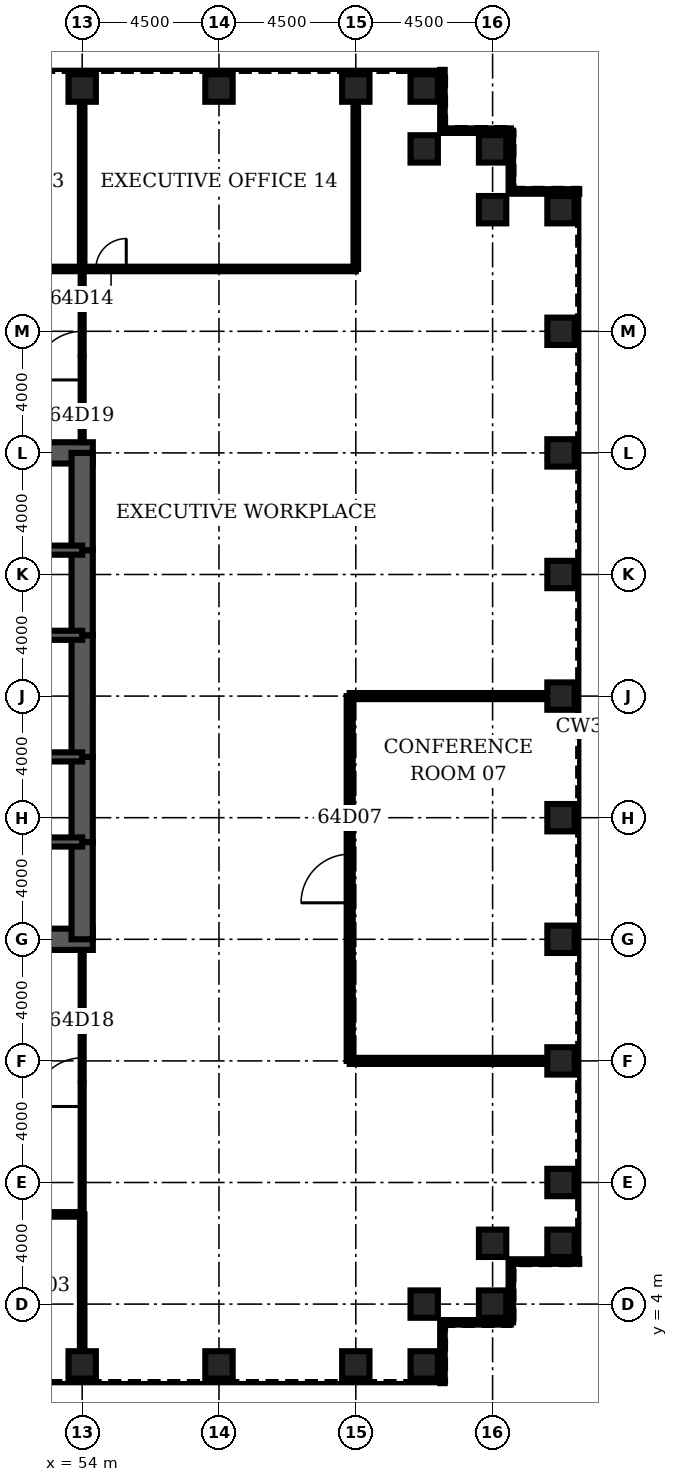
"""IFC4 building model, lengths in metres.
Left out: names, types, materials, properties, quantities, classifications, styles, units other than length and angle.
Written with IfcOpenShell. Run it as: python <this file> out.ifc"""

import sys

from ifc_helpers import new_model, si_unit, direction, frame, frame_2d, origin, origin_2d, place, context, subcontext, project, spatial, rectangle, hollow_rectangle, extrude, element, fill, save


model = new_model("IFC4")
c1 = context("Model", 3, precision=1e-05, world=origin(), true_north=direction((0.0, 1.0)))
c2 = subcontext(c1, "Body", "Model", "MODEL_VIEW")
j1 = project(units=[si_unit("LENGTHUNIT", "METRE"), si_unit("PLANEANGLEUNIT", "RADIAN")], contexts=[c1])
p1 = place(None, origin())
s1 = spatial("IfcSite", under=j1, at=p1, CompositionType="ELEMENT")
p2 = place(p1, origin())
s2 = spatial("IfcBuilding", under=s1, at=p2, CompositionType="ELEMENT")
p3 = place(p2, frame((0.0, 0.0, 283.7)))
s3 = spatial("IfcBuildingStorey", under=s2, at=p3, CompositionType="ELEMENT", Elevation=283.7)
for number, where, z_axis, x_axis in (
    (1, (54.0, 2.0, 0.0), (0.0, 0.0, 1.0), (0.0, 1.0, 0.0)),
    (2, (58.5, 2.0, 0.0), (0.0, 0.0, 1.0), (0.0, 1.0, 0.0)),
    (3, (63.0, 2.0, 0.0), (0.0, 0.0, 1.0), (0.0, 1.0, 0.0)),
    (4, (65.25, 2.0, 0.0), (0.0, 0.0, 1.0), (0.0, 1.0, 0.0)),
    (5, (65.25, 4.0, 0.0), (0.0, 0.0, 1.0), (0.0, 1.0, 0.0)),
    (6, (67.5, 4.0, 0.0), (0.0, 0.0, 1.0), (1.0, 0.0, 0.0)),
    (7, (67.5, 6.0, 0.0), (0.0, 0.0, 1.0), (1.0, 0.0, 0.0)),
    (8, (69.75, 6.0, 0.0), (0.0, 0.0, 1.0), (1.0, 0.0, 0.0)),
    (9, (69.75, 8.0, 0.0), (0.0, 0.0, 1.0), (1.0, 0.0, 0.0)),
    (10, (69.75, 12.0, 0.0), (0.0, 0.0, 1.0), (1.0, 0.0, 0.0)),
    (11, (69.75, 16.0, 0.0), (0.0, 0.0, 1.0), (1.0, 0.0, 0.0)),
    (12, (69.75, 20.0, 0.0), (0.0, 0.0, 1.0), (1.0, 0.0, 0.0)),
    (13, (69.75, 24.0, 0.0), (0.0, 0.0, 1.0), (1.0, 0.0, 0.0)),
    (14, (69.75, 28.0, 0.0), (0.0, 0.0, 1.0), (1.0, 0.0, 0.0)),
    (15, (69.75, 32.0, 0.0), (0.0, 0.0, 1.0), (1.0, 0.0, 0.0)),
    (16, (69.75, 36.0, 0.0), (0.0, 0.0, 1.0), (1.0, 0.0, 0.0)),
    (17, (69.75, 40.0, 0.0), (0.0, 0.0, 1.0), (1.0, 0.0, 0.0)),
    (18, (67.5, 40.0, 0.0), (0.0, 0.0, 1.0), (1.0, 0.0, 0.0)),
    (19, (67.5, 42.0, 0.0), (0.0, 0.0, 1.0), (1.0, 0.0, 0.0)),
    (20, (65.25, 42.0, 0.0), (0.0, 0.0, 1.0), (0.0, 1.0, 0.0)),
    (21, (65.25, 44.0, 0.0), (0.0, 0.0, 1.0), (0.0, 1.0, 0.0)),
    (22, (63.0, 44.0, 0.0), (0.0, 0.0, 1.0), (0.0, 1.0, 0.0)),
    (23, (58.5, 44.0, 0.0), (0.0, 0.0, 1.0), (0.0, 1.0, 0.0)),
    (24, (54.0, 44.0, 0.0), (0.0, 0.0, 1.0), (0.0, 1.0, 0.0)),
):
    element("IfcColumn", number, at=place(p3, frame(where, z_axis=z_axis, x_axis=x_axis)), inside=s3, PredefinedType="COLUMN", context=c2, shape_type="SweptSolid", body=[
        extrude(hollow_rectangle(XDim=0.9, YDim=0.9, WallThickness=0.07, at=origin_2d()), origin(), (0.0, 0.0, 1.0), 4.2),
    ])
for number, where, z_axis, x_axis in (
    (25, (45.0, 16.0, 0.0), (0.0, 0.0, 1.0), (1.0, 0.0, 0.0)),
    (26, (54.35, 32.0, 0.0), (0.0, 0.0, 1.0), (-1.0, 0.0, 0.0)),
):
    element("IfcWall", number, at=place(p3, frame(where, z_axis=z_axis, x_axis=x_axis)), inside=s3, PredefinedType="SHEAR", context=c2, shape_type="SweptSolid", body=[
        extrude(rectangle(XDim=9.35, YDim=0.7, at=frame_2d((4.675, 0.0))), origin(), (0.0, 0.0, 1.0), 4.2),
    ])
p4 = place(p3, frame((54.0, 16.0, 0.0), z_axis=(0.0, 0.0, 1.0), x_axis=(0.0, 1.0, 0.0)))
e27 = element("IfcWall", 27, at=p4, inside=s3, PredefinedType="SHEAR", context=c2, shape_type="SweptSolid", body=[
    extrude(rectangle(XDim=3.2, YDim=0.7, at=frame_2d((1.6, 0.0))), origin(), (0.0, 0.0, 1.0), 4.2),
])
p5 = place(p3, frame((54.0, 19.2, 0.0), z_axis=(0.0, 0.0, 1.0), x_axis=(0.0, 1.0, 0.0)))
e28 = element("IfcWall", 28, at=p5, inside=s3, PredefinedType="SHEAR", context=c2, shape_type="SweptSolid", body=[
    extrude(rectangle(XDim=2.8, YDim=0.7, at=frame_2d((1.4, 0.0))), origin(), (0.0, 0.0, 1.0), 4.2),
])
p6 = place(p5, frame((0.4, 0.0, 0.0)))
e29 = element("IfcOpeningElement", 29, at=p6, cuts=e28, PredefinedType="OPENING", context=c2, shape_type="SweptSolid", body=[
    extrude(rectangle(XDim=1.8, YDim=2.1, at=frame_2d((0.9, 1.05))), frame((0.0, 0.36, 0.0), z_axis=(0.0, -1.0, 0.0), x_axis=(1.0, 0.0, 0.0)), (0.0, 0.0, 1.0), 0.72),
])
p7 = place(p3, frame((54.0, 22.0, 0.0), z_axis=(0.0, 0.0, 1.0), x_axis=(0.0, 1.0, 0.0)))
e30 = element("IfcWall", 30, at=p7, inside=s3, PredefinedType="SHEAR", context=c2, shape_type="SweptSolid", body=[
    extrude(rectangle(XDim=4.0, YDim=0.7, at=frame_2d((2.0, 0.0))), origin(), (0.0, 0.0, 1.0), 4.2),
])
p8 = place(p3, frame((54.0, 26.0, 0.0), z_axis=(0.0, 0.0, 1.0), x_axis=(0.0, 1.0, 0.0)))
e31 = element("IfcWall", 31, at=p8, inside=s3, PredefinedType="SHEAR", context=c2, shape_type="SweptSolid", body=[
    extrude(rectangle(XDim=2.8, YDim=0.7, at=frame_2d((1.4, 0.0))), origin(), (0.0, 0.0, 1.0), 4.2),
])
p9 = place(p8, frame((0.6, 0.0, 0.0)))
e32 = element("IfcOpeningElement", 32, at=p9, cuts=e31, PredefinedType="OPENING", context=c2, shape_type="SweptSolid", body=[
    extrude(rectangle(XDim=1.8, YDim=2.1, at=frame_2d((0.9, 1.05))), frame((0.0, 0.36, 0.0), z_axis=(0.0, -1.0, 0.0), x_axis=(1.0, 0.0, 0.0)), (0.0, 0.0, 1.0), 0.72),
])
p10 = place(p3, frame((54.0, 28.8, 0.0), z_axis=(0.0, 0.0, 1.0), x_axis=(0.0, 1.0, 0.0)))
e33 = element("IfcWall", 33, at=p10, inside=s3, PredefinedType="SHEAR", context=c2, shape_type="SweptSolid", body=[
    extrude(rectangle(XDim=3.2, YDim=0.7, at=frame_2d((1.6, 0.0))), origin(), (0.0, 0.0, 1.0), 4.2),
])
p11 = place(p3, frame((45.0, 19.2, 0.0), z_axis=(0.0, 0.0, 1.0), x_axis=(1.0, 0.0, 0.0)))
e34 = element("IfcWall", 34, at=p11, inside=s3, PredefinedType="SOLIDWALL", context=c2, shape_type="SweptSolid", body=[
    extrude(rectangle(XDim=9.0, YDim=0.3, at=frame_2d((4.5, 0.0))), origin(), (0.0, 0.0, 1.0), 4.2),
])
p12 = place(p11, frame((7.35, 0.0, 0.0)))
e35 = element("IfcOpeningElement", 35, at=p12, cuts=e34, PredefinedType="OPENING", context=c2, shape_type="SweptSolid", body=[
    extrude(rectangle(XDim=1.0, YDim=2.1, at=frame_2d((0.5, 1.05))), frame((0.0, 0.16, 0.0), z_axis=(0.0, -1.0, 0.0), x_axis=(1.0, 0.0, 0.0)), (0.0, 0.0, 1.0), 0.32),
])
p13 = place(p3, frame((45.0, 28.8, 0.0), z_axis=(0.0, 0.0, 1.0), x_axis=(1.0, 0.0, 0.0)))
e36 = element("IfcWall", 36, at=p13, inside=s3, PredefinedType="SOLIDWALL", context=c2, shape_type="SweptSolid", body=[
    extrude(rectangle(XDim=9.0, YDim=0.3, at=frame_2d((4.5, 0.0))), origin(), (0.0, 0.0, 1.0), 4.2),
])
p14 = place(p13, frame((7.35, 0.0, 0.0)))
e37 = element("IfcOpeningElement", 37, at=p14, cuts=e36, PredefinedType="OPENING", context=c2, shape_type="SweptSolid", body=[
    extrude(rectangle(XDim=1.0, YDim=2.1, at=frame_2d((0.5, 1.05))), frame((0.0, 0.16, 0.0), z_axis=(0.0, -1.0, 0.0), x_axis=(1.0, 0.0, 0.0)), (0.0, 0.0, 1.0), 0.32),
])
p15 = place(p3, frame((48.0, 22.0, 0.0), z_axis=(0.0, 0.0, 1.0), x_axis=(1.0, 0.0, 0.0)))
e38 = element("IfcWall", 38, at=p15, inside=s3, PredefinedType="SOLIDWALL", context=c2, shape_type="SweptSolid", body=[
    extrude(rectangle(XDim=6.0, YDim=0.3, at=frame_2d((3.0, 0.0))), origin(), (0.0, 0.0, 1.0), 4.2),
])
p16 = place(p15, frame((2.0, 0.0, 0.0)))
e39 = element("IfcOpeningElement", 39, at=p16, cuts=e38, PredefinedType="OPENING", context=c2, shape_type="SweptSolid", body=[
    extrude(rectangle(XDim=1.0, YDim=2.1, at=frame_2d((0.5, 1.05))), frame((0.0, 0.16, 0.0), z_axis=(0.0, -1.0, 0.0), x_axis=(1.0, 0.0, 0.0)), (0.0, 0.0, 1.0), 0.32),
])
p17 = place(p15, frame((4.4, 0.0, 0.0)))
e40 = element("IfcOpeningElement", 40, at=p17, cuts=e38, PredefinedType="OPENING", context=c2, shape_type="SweptSolid", body=[
    extrude(rectangle(XDim=1.0, YDim=2.1, at=frame_2d((0.5, 1.05))), frame((0.0, 0.16, 0.0), z_axis=(0.0, -1.0, 0.0), x_axis=(1.0, 0.0, 0.0)), (0.0, 0.0, 1.0), 0.32),
])
p18 = place(p3, frame((48.0, 26.0, 0.0), z_axis=(0.0, 0.0, 1.0), x_axis=(1.0, 0.0, 0.0)))
e41 = element("IfcWall", 41, at=p18, inside=s3, PredefinedType="SOLIDWALL", context=c2, shape_type="SweptSolid", body=[
    extrude(rectangle(XDim=6.0, YDim=0.3, at=frame_2d((3.0, 0.0))), origin(), (0.0, 0.0, 1.0), 4.2),
])
p19 = place(p3, frame((49.5, 6.95, 0.0), z_axis=(0.0, 0.0, 1.0), x_axis=(1.0, 0.0, 0.0)))
e42 = element("IfcWall", 42, at=p19, inside=s3, PredefinedType="PARTITIONING", context=c2, shape_type="SweptSolid", body=[
    extrude(rectangle(XDim=4.5, YDim=0.15, at=frame_2d((2.25, 0.0))), origin(), (0.0, 0.0, 1.0), 3.0),
])
p20 = place(p19, frame((0.45, 0.0, 0.0)))
e43 = element("IfcOpeningElement", 43, at=p20, cuts=e42, PredefinedType="OPENING", context=c2, shape_type="SweptSolid", body=[
    extrude(rectangle(XDim=1.0, YDim=2.1, at=frame_2d((0.5, 1.05))), frame((0.0, 0.085, 0.0), z_axis=(0.0, -1.0, 0.0), x_axis=(1.0, 0.0, 0.0)), (0.0, 0.0, 1.0), 0.17),
])
for number, where, z_axis, x_axis in (
    (44, (62.8, 12.0, 0.0), (0.0, 0.0, 1.0), (1.0, 0.0, 0.0)),
    (45, (62.8, 24.0, 0.0), (0.0, 0.0, 1.0), (1.0, 0.0, 0.0)),
):
    element("IfcWall", number, at=place(p3, frame(where, z_axis=z_axis, x_axis=x_axis)), inside=s3, PredefinedType="PARTITIONING", context=c2, shape_type="SweptSolid", body=[
        extrude(rectangle(XDim=6.5, YDim=0.2, at=frame_2d((3.25, 0.0))), origin(), (0.0, 0.0, 1.0), 3.0),
    ])
p21 = place(p3, frame((9.0, 38.05, 0.0), z_axis=(0.0, 0.0, 1.0), x_axis=(1.0, 0.0, 0.0)))
e46 = element("IfcWall", 46, at=p21, inside=s3, PredefinedType="PARTITIONING", context=c2, shape_type="SweptSolid", body=[
    extrude(rectangle(XDim=54.0, YDim=0.15, at=frame_2d((27.0, 0.0))), origin(), (0.0, 0.0, 1.0), 3.0),
])
p22 = place(p21, frame((0.45, 0.0, 0.0)))
e47 = element("IfcOpeningElement", 47, at=p22, cuts=e46, PredefinedType="OPENING", context=c2, shape_type="SweptSolid", body=[
    extrude(rectangle(XDim=1.0, YDim=2.1, at=frame_2d((0.5, 1.05))), frame((0.0, 0.085, 0.0), z_axis=(0.0, -1.0, 0.0), x_axis=(1.0, 0.0, 0.0)), (0.0, 0.0, 1.0), 0.17),
])
p23 = place(p21, frame((9.45, 0.0, 0.0)))
e48 = element("IfcOpeningElement", 48, at=p23, cuts=e46, PredefinedType="OPENING", context=c2, shape_type="SweptSolid", body=[
    extrude(rectangle(XDim=1.0, YDim=2.1, at=frame_2d((0.5, 1.05))), frame((0.0, 0.085, 0.0), z_axis=(0.0, -1.0, 0.0), x_axis=(1.0, 0.0, 0.0)), (0.0, 0.0, 1.0), 0.17),
])
p24 = place(p21, frame((18.45, 0.0, 0.0)))
e49 = element("IfcOpeningElement", 49, at=p24, cuts=e46, PredefinedType="OPENING", context=c2, shape_type="SweptSolid", body=[
    extrude(rectangle(XDim=1.0, YDim=2.1, at=frame_2d((0.5, 1.05))), frame((0.0, 0.085, 0.0), z_axis=(0.0, -1.0, 0.0), x_axis=(1.0, 0.0, 0.0)), (0.0, 0.0, 1.0), 0.17),
])
p25 = place(p21, frame((27.45, 0.0, 0.0)))
e50 = element("IfcOpeningElement", 50, at=p25, cuts=e46, PredefinedType="OPENING", context=c2, shape_type="SweptSolid", body=[
    extrude(rectangle(XDim=1.0, YDim=2.1, at=frame_2d((0.5, 1.05))), frame((0.0, 0.085, 0.0), z_axis=(0.0, -1.0, 0.0), x_axis=(1.0, 0.0, 0.0)), (0.0, 0.0, 1.0), 0.17),
])
p26 = place(p21, frame((36.45, 0.0, 0.0)))
e51 = element("IfcOpeningElement", 51, at=p26, cuts=e46, PredefinedType="OPENING", context=c2, shape_type="SweptSolid", body=[
    extrude(rectangle(XDim=1.0, YDim=2.1, at=frame_2d((0.5, 1.05))), frame((0.0, 0.085, 0.0), z_axis=(0.0, -1.0, 0.0), x_axis=(1.0, 0.0, 0.0)), (0.0, 0.0, 1.0), 0.17),
])
p27 = place(p21, frame((45.45, 0.0, 0.0)))
e52 = element("IfcOpeningElement", 52, at=p27, cuts=e46, PredefinedType="OPENING", context=c2, shape_type="SweptSolid", body=[
    extrude(rectangle(XDim=1.0, YDim=2.1, at=frame_2d((0.5, 1.05))), frame((0.0, 0.085, 0.0), z_axis=(0.0, -1.0, 0.0), x_axis=(1.0, 0.0, 0.0)), (0.0, 0.0, 1.0), 0.17),
])
p28 = place(p3, frame((54.0, 2.45, 0.0), z_axis=(0.0, 0.0, 1.0), x_axis=(0.0, 1.0, 0.0)))
e53 = element("IfcWall", 53, at=p28, inside=s3, PredefinedType="PARTITIONING", context=c2, shape_type="SweptSolid", body=[
    extrude(rectangle(XDim=4.5, YDim=0.15, at=frame_2d((2.25, 0.0))), origin(), (0.0, 0.0, 1.0), 3.0),
])
p29 = place(p3, frame((54.0, 6.95, 0.0), z_axis=(0.0, 0.0, 1.0), x_axis=(0.0, 1.0, 0.0)))
e54 = element("IfcWall", 54, at=p29, inside=s3, PredefinedType="PARTITIONING", context=c2, shape_type="SweptSolid", body=[
    extrude(rectangle(XDim=8.7, YDim=0.1, at=frame_2d((4.35, 0.0))), origin(), (0.0, 0.0, 1.0), 3.0),
])
p30 = place(p29, frame((3.55, 0.0, 0.0)))
e55 = element("IfcOpeningElement", 55, at=p30, cuts=e54, PredefinedType="OPENING", context=c2, shape_type="SweptSolid", body=[
    extrude(rectangle(XDim=1.6, YDim=2.1, at=frame_2d((0.8, 1.05))), frame((0.0, 0.06, 0.0), z_axis=(0.0, -1.0, 0.0), x_axis=(1.0, 0.0, 0.0)), (0.0, 0.0, 1.0), 0.12),
])
p31 = place(p3, frame((54.0, 32.35, 0.0), z_axis=(0.0, 0.0, 1.0), x_axis=(0.0, 1.0, 0.0)))
e56 = element("IfcWall", 56, at=p31, inside=s3, PredefinedType="PARTITIONING", context=c2, shape_type="SweptSolid", body=[
    extrude(rectangle(XDim=5.7, YDim=0.1, at=frame_2d((2.85, 0.0))), origin(), (0.0, 0.0, 1.0), 3.0),
])
p32 = place(p31, frame((2.05, 0.0, 0.0)))
e57 = element("IfcOpeningElement", 57, at=p32, cuts=e56, PredefinedType="OPENING", context=c2, shape_type="SweptSolid", body=[
    extrude(rectangle(XDim=1.6, YDim=2.1, at=frame_2d((0.8, 1.05))), frame((0.0, 0.06, 0.0), z_axis=(0.0, -1.0, 0.0), x_axis=(1.0, 0.0, 0.0)), (0.0, 0.0, 1.0), 0.12),
])
p33 = place(p3, frame((54.0, 38.05, 0.0), z_axis=(0.0, 0.0, 1.0), x_axis=(0.0, 1.0, 0.0)))
e58 = element("IfcWall", 58, at=p33, inside=s3, PredefinedType="PARTITIONING", context=c2, shape_type="SweptSolid", body=[
    extrude(rectangle(XDim=5.5, YDim=0.15, at=frame_2d((2.75, 0.0))), origin(), (0.0, 0.0, 1.0), 3.0),
])
p34 = place(p3, frame((62.8, 12.0, 0.0), z_axis=(0.0, 0.0, 1.0), x_axis=(0.0, 1.0, 0.0)))
e59 = element("IfcWall", 59, at=p34, inside=s3, PredefinedType="PARTITIONING", context=c2, shape_type="SweptSolid", body=[
    extrude(rectangle(XDim=12.0, YDim=0.2, at=frame_2d((6.0, 0.0))), origin(), (0.0, 0.0, 1.0), 3.0),
])
p35 = place(p34, frame((5.2, 0.0, 0.0)))
e60 = element("IfcOpeningElement", 60, at=p35, cuts=e59, PredefinedType="OPENING", context=c2, shape_type="SweptSolid", body=[
    extrude(rectangle(XDim=1.6, YDim=2.1, at=frame_2d((0.8, 1.05))), frame((0.0, 0.11, 0.0), z_axis=(0.0, -1.0, 0.0), x_axis=(1.0, 0.0, 0.0)), (0.0, 0.0, 1.0), 0.22),
])
p36 = place(p3, frame((63.0, 38.05, 0.0), z_axis=(0.0, 0.0, 1.0), x_axis=(0.0, 1.0, 0.0)))
e61 = element("IfcWall", 61, at=p36, inside=s3, PredefinedType="PARTITIONING", context=c2, shape_type="SweptSolid", body=[
    extrude(rectangle(XDim=5.5, YDim=0.15, at=frame_2d((2.75, 0.0))), origin(), (0.0, 0.0, 1.0), 3.0),
])
p37 = place(p3, frame((65.85, 1.4, 0.0), z_axis=(0.0, 0.0, 1.0), x_axis=(0.0, 1.0, 0.0)))
e62 = element("IfcWall", 62, at=p37, inside=s3, PredefinedType="ELEMENTEDWALL", context=c2, shape_type="SweptSolid", body=[
    extrude(rectangle(XDim=2.0, YDim=0.15, at=frame_2d((1.0, 0.0))), origin(), (0.0, 0.0, 1.0), 4.04),
])
p38 = place(p3, frame((65.85, 3.4, 0.0), z_axis=(0.0, 0.0, 1.0), x_axis=(1.0, 0.0, 0.0)))
e63 = element("IfcWall", 63, at=p38, inside=s3, PredefinedType="ELEMENTEDWALL", context=c2, shape_type="SweptSolid", body=[
    extrude(rectangle(XDim=2.25, YDim=0.15, at=frame_2d((1.125, 0.0))), origin(), (0.0, 0.0, 1.0), 4.04),
])
p39 = place(p3, frame((68.1, 3.4, 0.0), z_axis=(0.0, 0.0, 1.0), x_axis=(0.0, 1.0, 0.0)))
e64 = element("IfcWall", 64, at=p39, inside=s3, PredefinedType="ELEMENTEDWALL", context=c2, shape_type="SweptSolid", body=[
    extrude(rectangle(XDim=2.0, YDim=0.15, at=frame_2d((1.0, 0.0))), origin(), (0.0, 0.0, 1.0), 4.04),
])
for number, where, z_axis, x_axis in (
    (65, (68.1, 5.4, 0.0), (0.0, 0.0, 1.0), (1.0, 0.0, 0.0)),
    (66, (70.35, 40.6, 0.0), (0.0, 0.0, 1.0), (-1.0, 0.0, 0.0)),
):
    element("IfcWall", number, at=place(p3, frame(where, z_axis=z_axis, x_axis=x_axis)), inside=s3, PredefinedType="ELEMENTEDWALL", context=c2, shape_type="SweptSolid", body=[
        extrude(rectangle(XDim=2.25, YDim=0.15, at=frame_2d((1.125, 0.0))), origin(), (0.0, 0.0, 1.0), 4.04),
    ])
p40 = place(p3, frame((68.1, 40.6, 0.0), z_axis=(0.0, 0.0, 1.0), x_axis=(0.0, 1.0, 0.0)))
e67 = element("IfcWall", 67, at=p40, inside=s3, PredefinedType="ELEMENTEDWALL", context=c2, shape_type="SweptSolid", body=[
    extrude(rectangle(XDim=2.0, YDim=0.15, at=frame_2d((1.0, 0.0))), origin(), (0.0, 0.0, 1.0), 4.04),
])
p41 = place(p3, frame((68.1, 42.6, 0.0), z_axis=(0.0, 0.0, 1.0), x_axis=(-1.0, 0.0, 0.0)))
e68 = element("IfcWall", 68, at=p41, inside=s3, PredefinedType="ELEMENTEDWALL", context=c2, shape_type="SweptSolid", body=[
    extrude(rectangle(XDim=2.25, YDim=0.15, at=frame_2d((1.125, 0.0))), origin(), (0.0, 0.0, 1.0), 4.04),
])
p42 = place(p3, frame((65.85, 42.6, 0.0), z_axis=(0.0, 0.0, 1.0), x_axis=(0.0, 1.0, 0.0)))
e69 = element("IfcWall", 69, at=p42, inside=s3, PredefinedType="ELEMENTEDWALL", context=c2, shape_type="SweptSolid", body=[
    extrude(rectangle(XDim=2.0, YDim=0.15, at=frame_2d((1.0, 0.0))), origin(), (0.0, 0.0, 1.0), 4.04),
])
p43 = place(p35, origin())
e70 = element("IfcDoor", 70, at=p43, inside=s3, OperationType="SINGLE_SWING_LEFT", PredefinedType="DOOR", context=c2, shape_type="SweptSolid", body=[
    extrude(rectangle(XDim=1.6, YDim=2.1, at=frame_2d((0.8, 1.05))), frame((0.0, 0.025, 0.0), z_axis=(0.0, -1.0, 0.0), x_axis=(1.0, 0.0, 0.0)), (0.0, 0.0, 1.0), 0.05),
])
fill(e60, e70)
p44 = place(p27, origin())
e71 = element("IfcDoor", 71, at=p44, inside=s3, OperationType="SINGLE_SWING_RIGHT", PredefinedType="DOOR", context=c2, shape_type="SweptSolid", body=[
    extrude(rectangle(XDim=1.0, YDim=2.1, at=frame_2d((0.5, 1.05))), frame((0.0, 0.025, 0.0), z_axis=(0.0, -1.0, 0.0), x_axis=(1.0, 0.0, 0.0)), (0.0, 0.0, 1.0), 0.05),
])
fill(e52, e71)
p45 = place(p30, origin())
e72 = element("IfcDoor", 72, at=p45, inside=s3, OperationType="SINGLE_SWING_LEFT", PredefinedType="DOOR", context=c2, shape_type="SweptSolid", body=[
    extrude(rectangle(XDim=1.6, YDim=2.1, at=frame_2d((0.8, 1.05))), frame((0.0, 0.025, 0.0), z_axis=(0.0, -1.0, 0.0), x_axis=(1.0, 0.0, 0.0)), (0.0, 0.0, 1.0), 0.05),
])
fill(e55, e72)
p46 = place(p32, origin())
e73 = element("IfcDoor", 73, at=p46, inside=s3, OperationType="SINGLE_SWING_LEFT", PredefinedType="DOOR", context=c2, shape_type="SweptSolid", body=[
    extrude(rectangle(XDim=1.6, YDim=2.1, at=frame_2d((0.8, 1.05))), frame((0.0, 0.025, 0.0), z_axis=(0.0, -1.0, 0.0), x_axis=(1.0, 0.0, 0.0)), (0.0, 0.0, 1.0), 0.05),
])
fill(e57, e73)
p47 = place(p12, origin())
e74 = element("IfcDoor", 74, at=p47, inside=s3, OperationType="SINGLE_SWING_RIGHT", PredefinedType="DOOR", context=c2, shape_type="SweptSolid", body=[
    extrude(rectangle(XDim=1.0, YDim=2.1, at=frame_2d((0.5, 1.05))), frame((0.0, 0.025, 0.0), z_axis=(0.0, -1.0, 0.0), x_axis=(1.0, 0.0, 0.0)), (0.0, 0.0, 1.0), 0.05),
])
fill(e35, e74)
p48 = place(p14, origin())
e75 = element("IfcDoor", 75, at=p48, inside=s3, OperationType="SINGLE_SWING_RIGHT", PredefinedType="DOOR", context=c2, shape_type="SweptSolid", body=[
    extrude(rectangle(XDim=1.0, YDim=2.1, at=frame_2d((0.5, 1.05))), frame((0.0, 0.025, 0.0), z_axis=(0.0, -1.0, 0.0), x_axis=(1.0, 0.0, 0.0)), (0.0, 0.0, 1.0), 0.05),
])
fill(e37, e75)
p49 = place(p6, origin())
e76 = element("IfcDoor", 76, at=p49, inside=s3, OperationType="SINGLE_SWING_LEFT", PredefinedType="DOOR", context=c2, shape_type="SweptSolid", body=[
    extrude(rectangle(XDim=1.8, YDim=2.1, at=frame_2d((0.9, 1.05))), frame((0.0, 0.35, 0.0), z_axis=(0.0, -1.0, 0.0), x_axis=(1.0, 0.0, 0.0)), (0.0, 0.0, 1.0), 0.699),
])
fill(e29, e76)
p50 = place(p9, origin())
e77 = element("IfcDoor", 77, at=p50, inside=s3, OperationType="SINGLE_SWING_LEFT", PredefinedType="DOOR", context=c2, shape_type="SweptSolid", body=[
    extrude(rectangle(XDim=1.8, YDim=2.1, at=frame_2d((0.9, 1.05))), frame((0.0, 0.35, 0.0), z_axis=(0.0, -1.0, 0.0), x_axis=(1.0, 0.0, 0.0)), (0.0, 0.0, 1.0), 0.699),
])
fill(e32, e77)
p51 = place(p17, origin())
e78 = element("IfcDoor", 78, at=p51, inside=s3, OperationType="SINGLE_SWING_RIGHT", PredefinedType="DOOR", context=c2, shape_type="SweptSolid", body=[
    extrude(rectangle(XDim=1.0, YDim=2.1, at=frame_2d((0.5, 1.05))), frame((0.0, 0.025, 0.0), z_axis=(0.0, -1.0, 0.0), x_axis=(1.0, 0.0, 0.0)), (0.0, 0.0, 1.0), 0.05),
])
fill(e40, e78)
save(model, sys.argv[1])
